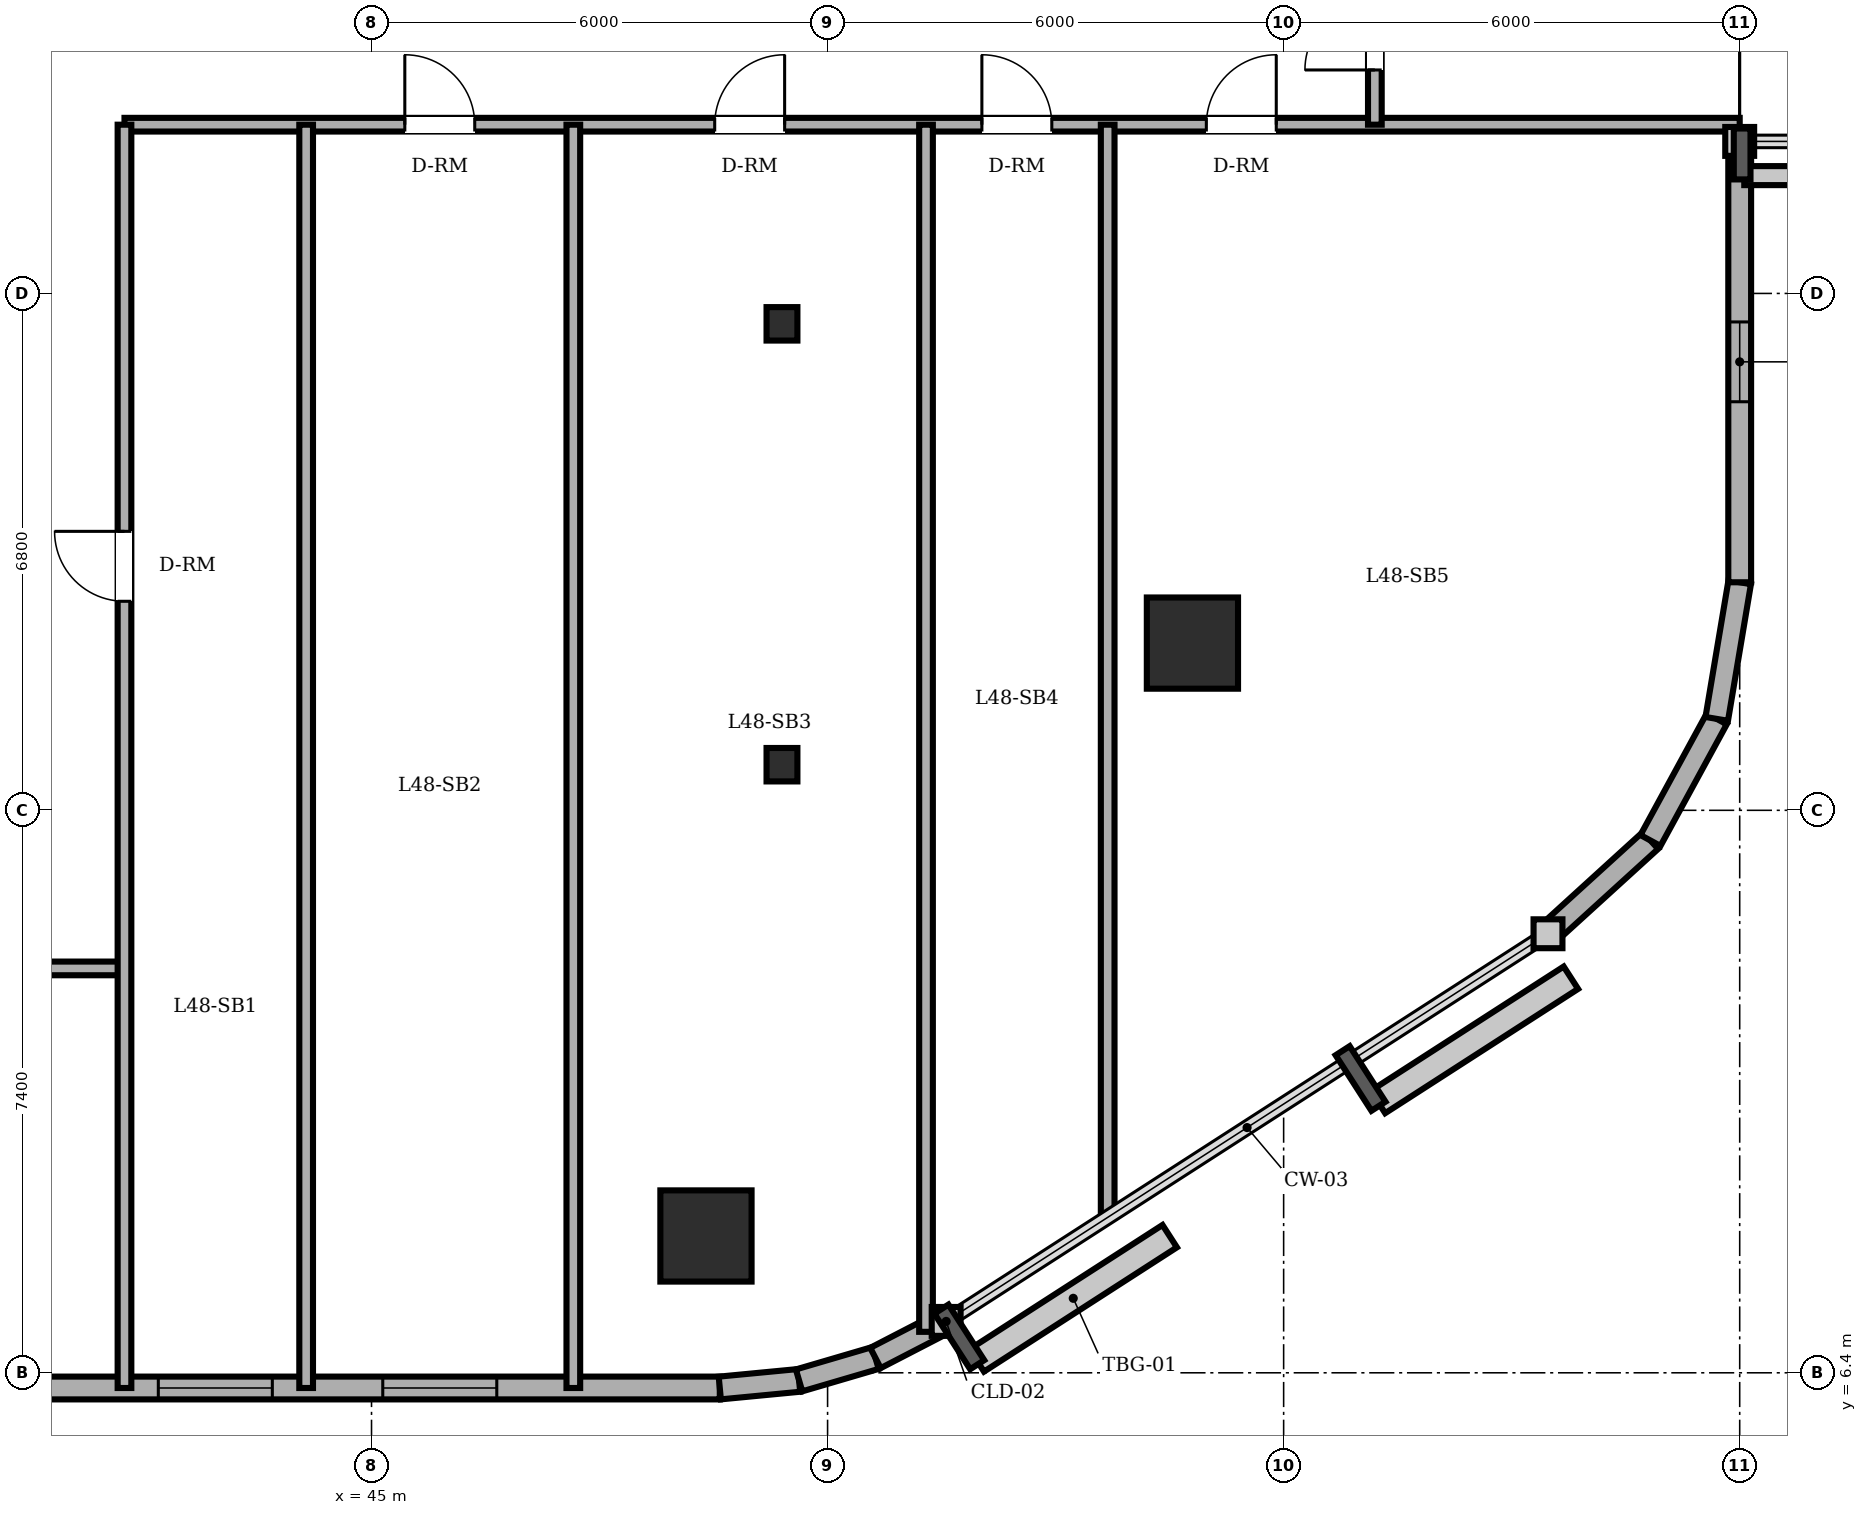
"""IFC4 building model, lengths in metres.
Left out: names, types, materials, properties, quantities, classifications, styles, units other than length and angle.
Written with IfcOpenShell. Run it as: python <this file> out.ifc"""

import sys

from ifc_helpers import new_model, si_unit, direction, frame, frame_2d, origin, origin_2d, place, context, subcontext, project, spatial, rectangle, circle, i_section, extrude, element, fill, save


model = new_model("IFC4")
c1 = context("Model", 3, precision=1e-05, world=origin(), true_north=direction((0.0, 1.0)))
c2 = subcontext(c1, "Body", "Model", "MODEL_VIEW")
j1 = project(units=[si_unit("LENGTHUNIT", "METRE"), si_unit("PLANEANGLEUNIT", "RADIAN")], contexts=[c1])
p1 = place(None, origin())
s1 = spatial("IfcSite", under=j1, at=p1, CompositionType="ELEMENT")
p2 = place(p1, origin())
s2 = spatial("IfcBuilding", under=s1, at=p2, CompositionType="ELEMENT")
p3 = place(p2, frame((0.0, 0.0, 183.4)))
s3 = spatial("IfcBuildingStorey", under=s2, at=p3, CompositionType="ELEMENT", Elevation=183.4)
for number, where, z_axis, x_axis in (
    (1, (49.4, 8.2, 0.0), (0.0, 0.0, 1.0), (1.0, 0.0, 0.0)),
    (2, (55.8, 16.0, 0.0), (0.0, 0.0, 1.0), (1.0, 0.0, 0.0)),
):
    element("IfcColumn", number, at=place(p3, frame(where, z_axis=z_axis, x_axis=x_axis)), inside=s3, PredefinedType="COLUMN", context=c2, shape_type="SweptSolid", body=[
        extrude(circle(Radius=0.6, at=origin_2d()), origin(), (0.0, 0.0, 1.0), 3.6),
    ])
for number, where, z_axis, x_axis in (
    (3, (50.4, 14.4, 0.0), (0.0, 0.0, 1.0), (1.0, 0.0, 0.0)),
    (4, (50.4, 20.2, 0.0), (0.0, 0.0, 1.0), (1.0, 0.0, 0.0)),
):
    element("IfcColumn", number, at=place(p3, frame(where, z_axis=z_axis, x_axis=x_axis)), inside=s3, PredefinedType="COLUMN", context=c2, shape_type="SweptSolid", body=[
        extrude(i_section(OverallWidth=0.406, OverallDepth=0.44, WebThickness=0.024, FlangeThickness=0.039, FilletRadius=0.015, at=origin_2d()), origin(), (0.0, 0.0, 1.0), 3.6),
    ])
p4 = place(p3, frame((19.3, 6.2, 0.0), z_axis=(0.0, 0.0, 1.0), x_axis=(1.0, 0.0, 0.0)))
e5 = element("IfcWall", 5, at=p4, inside=s3, PredefinedType="SOLIDWALL", context=c2, shape_type="SweptSolid", body=[
    extrude(rectangle(XDim=30.282, YDim=0.3, at=frame_2d((15.141, 0.0))), origin(), (0.0, 0.0, 1.0), 3.4),
])
p5 = place(p4, frame((3.725, 0.0, 0.0)))
e6 = element("IfcOpeningElement", 6, at=p5, cuts=e5, PredefinedType="OPENING", context=c2, shape_type="SweptSolid", body=[
    extrude(rectangle(XDim=0.95, YDim=2.2, at=frame_2d((0.475, 1.1))), frame((0.0, 0.16, 0.0), z_axis=(0.0, -1.0, 0.0), x_axis=(1.0, 0.0, 0.0)), (0.0, 0.0, 1.0), 0.32),
])
p6 = place(p4, frame((1.25, 0.0, 0.85)))
e7 = element("IfcOpeningElement", 7, at=p6, cuts=e5, PredefinedType="OPENING", context=c2, shape_type="SweptSolid", body=[
    extrude(rectangle(XDim=1.5, YDim=1.55, at=frame_2d((0.75, 0.775))), frame((0.0, 0.16, 0.0), z_axis=(0.0, -1.0, 0.0), x_axis=(1.0, 0.0, 0.0)), (0.0, 0.0, 1.0), 0.32),
])
p7 = place(p4, frame((6.45, 0.0, 0.85)))
e8 = element("IfcOpeningElement", 8, at=p7, cuts=e5, PredefinedType="OPENING", context=c2, shape_type="SweptSolid", body=[
    extrude(rectangle(XDim=1.5, YDim=1.55, at=frame_2d((0.75, 0.775))), frame((0.0, 0.16, 0.0), z_axis=(0.0, -1.0, 0.0), x_axis=(1.0, 0.0, 0.0)), (0.0, 0.0, 1.0), 0.32),
])
p8 = place(p4, frame((12.8, 0.0, 0.85)))
e9 = element("IfcOpeningElement", 9, at=p8, cuts=e5, PredefinedType="OPENING", context=c2, shape_type="SweptSolid", body=[
    extrude(rectangle(XDim=1.5, YDim=1.55, at=frame_2d((0.75, 0.775))), frame((0.0, 0.16, 0.0), z_axis=(0.0, -1.0, 0.0), x_axis=(1.0, 0.0, 0.0)), (0.0, 0.0, 1.0), 0.32),
])
p9 = place(p4, frame((17.25, 0.0, 0.85)))
e10 = element("IfcOpeningElement", 10, at=p9, cuts=e5, PredefinedType="OPENING", context=c2, shape_type="SweptSolid", body=[
    extrude(rectangle(XDim=1.5, YDim=1.55, at=frame_2d((0.75, 0.775))), frame((0.0, 0.16, 0.0), z_axis=(0.0, -1.0, 0.0), x_axis=(1.0, 0.0, 0.0)), (0.0, 0.0, 1.0), 0.32),
])
p10 = place(p4, frame((22.895, 0.0, 0.85)))
e11 = element("IfcOpeningElement", 11, at=p10, cuts=e5, PredefinedType="OPENING", context=c2, shape_type="SweptSolid", body=[
    extrude(rectangle(XDim=1.5, YDim=1.55, at=frame_2d((0.75, 0.775))), frame((0.0, 0.16, 0.0), z_axis=(0.0, -1.0, 0.0), x_axis=(1.0, 0.0, 0.0)), (0.0, 0.0, 1.0), 0.32),
])
p11 = place(p4, frame((25.848, 0.0, 0.85)))
e12 = element("IfcOpeningElement", 12, at=p11, cuts=e5, PredefinedType="OPENING", context=c2, shape_type="SweptSolid", body=[
    extrude(rectangle(XDim=1.5, YDim=1.55, at=frame_2d((0.75, 0.775))), frame((0.0, 0.16, 0.0), z_axis=(0.0, -1.0, 0.0), x_axis=(1.0, 0.0, 0.0)), (0.0, 0.0, 1.0), 0.32),
])
p12 = place(p3, frame((49.582, 6.2, 0.0), z_axis=(0.0, 0.0, 1.0), x_axis=(0.995426089968, 0.095534807324, 0.0)))
e13 = element("IfcWall", 13, at=p12, inside=s3, PredefinedType="SOLIDWALL", context=c2, shape_type="SweptSolid", body=[
    extrude(rectangle(XDim=1.048, YDim=0.3, at=frame_2d((0.524, 0.0))), origin(), (0.0, 0.0, 1.0), 3.4),
])
p13 = place(p3, frame((50.625, 6.3, 0.0), z_axis=(0.0, 0.0, 1.0), x_axis=(0.959528674476, 0.281610942363, 0.0)))
e14 = element("IfcWall", 14, at=p13, inside=s3, PredefinedType="SOLIDWALL", context=c2, shape_type="SweptSolid", body=[
    extrude(rectangle(XDim=1.047, YDim=0.3, at=frame_2d((0.524, 0.0))), origin(), (0.0, 0.0, 1.0), 3.4),
])
p14 = place(p3, frame((51.63, 6.595, 0.0), z_axis=(0.0, 0.0, 1.0), x_axis=(0.888283247196, 0.459296062198, 0.0)))
e15 = element("IfcWall", 15, at=p14, inside=s3, PredefinedType="SOLIDWALL", context=c2, shape_type="SweptSolid", body=[
    extrude(rectangle(XDim=1.047, YDim=0.3, at=frame_2d((0.523, 0.0))), origin(), (0.0, 0.0, 1.0), 3.4),
])
p15 = place(p3, frame((60.478, 12.176, 0.0), z_axis=(0.0, 0.0, 1.0), x_axis=(0.73947929393, 0.673179302897, 0.0)))
e16 = element("IfcWall", 16, at=p15, inside=s3, PredefinedType="SOLIDWALL", context=c2, shape_type="SweptSolid", body=[
    extrude(rectangle(XDim=1.823, YDim=0.3, at=frame_2d((0.911, 0.0))), origin(), (0.0, 0.0, 1.0), 3.4),
])
p16 = place(p3, frame((61.826, 13.403, 0.0), z_axis=(0.0, 0.0, 1.0), x_axis=(0.478608030646, 0.878028674362, 0.0)))
e17 = element("IfcWall", 17, at=p16, inside=s3, PredefinedType="SOLIDWALL", context=c2, shape_type="SweptSolid", body=[
    extrude(rectangle(XDim=1.822, YDim=0.3, at=frame_2d((0.911, 0.0))), origin(), (0.0, 0.0, 1.0), 3.4),
])
p17 = place(p3, frame((62.698, 15.003, 0.0), z_axis=(0.0, 0.0, 1.0), x_axis=(0.165724081207, 0.986172159873, 0.0)))
e18 = element("IfcWall", 18, at=p17, inside=s3, PredefinedType="SOLIDWALL", context=c2, shape_type="SweptSolid", body=[
    extrude(rectangle(XDim=1.822, YDim=0.3, at=frame_2d((0.911, 0.0))), origin(), (0.0, 0.0, 1.0), 3.4),
])
p18 = place(p3, frame((63.0, 16.8, 0.0), z_axis=(0.0, 0.0, 1.0), x_axis=(0.0, 1.0, 0.0)))
e19 = element("IfcWall", 19, at=p18, inside=s3, PredefinedType="SOLIDWALL", context=c2, shape_type="SweptSolid", body=[
    extrude(rectangle(XDim=5.8, YDim=0.3, at=frame_2d((2.9, 0.0))), origin(), (0.0, 0.0, 1.0), 3.4),
])
p19 = place(p18, frame((2.375, 0.0, 0.85)))
e20 = element("IfcOpeningElement", 20, at=p19, cuts=e19, PredefinedType="OPENING", context=c2, shape_type="SweptSolid", body=[
    extrude(rectangle(XDim=1.05, YDim=1.55, at=frame_2d((0.525, 0.775))), frame((0.0, 0.16, 0.0), z_axis=(0.0, -1.0, 0.0), x_axis=(1.0, 0.0, 0.0)), (0.0, 0.0, 1.0), 0.32),
])
p20 = place(p3, frame((13.8, 11.72, 0.0), z_axis=(0.0, 0.0, 1.0), x_axis=(1.0, 0.0, 0.0)))
e21 = element("IfcWall", 21, at=p20, inside=s3, PredefinedType="PARTITIONING", context=c2, shape_type="SweptSolid", body=[
    extrude(rectangle(XDim=27.95, YDim=0.18, at=frame_2d((13.975, 0.0))), origin(), (0.0, 0.0, 1.0), 3.4),
])
p21 = place(p20, frame((12.24, 0.0, 0.0)))
e22 = element("IfcOpeningElement", 22, at=p21, cuts=e21, PredefinedType="OPENING", context=c2, shape_type="SweptSolid", body=[
    extrude(rectangle(XDim=0.92, YDim=2.1, at=frame_2d((0.46, 1.05))), frame((0.0, 0.1, 0.0), z_axis=(0.0, -1.0, 0.0), x_axis=(1.0, 0.0, 0.0)), (0.0, 0.0, 1.0), 0.2),
])
p22 = place(p20, frame((5.54, 0.0, 0.0)))
e23 = element("IfcOpeningElement", 23, at=p22, cuts=e21, PredefinedType="OPENING", context=c2, shape_type="SweptSolid", body=[
    extrude(rectangle(XDim=0.92, YDim=2.1, at=frame_2d((0.46, 1.05))), frame((0.0, 0.1, 0.0), z_axis=(0.0, -1.0, 0.0), x_axis=(1.0, 0.0, 0.0)), (0.0, 0.0, 1.0), 0.2),
])
p23 = place(p20, frame((20.555, 0.0, 0.0)))
e24 = element("IfcOpeningElement", 24, at=p23, cuts=e21, PredefinedType="OPENING", context=c2, shape_type="SweptSolid", body=[
    extrude(rectangle(XDim=0.92, YDim=2.1, at=frame_2d((0.46, 1.05))), frame((0.0, 0.1, 0.0), z_axis=(0.0, -1.0, 0.0), x_axis=(1.0, 0.0, 0.0)), (0.0, 0.0, 1.0), 0.2),
])
p24 = place(p3, frame((41.75, 22.82, 0.0), z_axis=(0.0, 0.0, 1.0), x_axis=(1.0, 0.0, 0.0)))
e25 = element("IfcWall", 25, at=p24, inside=s3, PredefinedType="PARTITIONING", context=c2, shape_type="SweptSolid", body=[
    extrude(rectangle(XDim=21.25, YDim=0.18, at=frame_2d((10.625, 0.0))), origin(), (0.0, 0.0, 1.0), 3.4),
])
p25 = place(p24, frame((3.688, 0.0, 0.0)))
e26 = element("IfcOpeningElement", 26, at=p25, cuts=e25, PredefinedType="OPENING", context=c2, shape_type="SweptSolid", body=[
    extrude(rectangle(XDim=0.92, YDim=2.1, at=frame_2d((0.46, 1.05))), frame((0.0, 0.1, 0.0), z_axis=(0.0, -1.0, 0.0), x_axis=(1.0, 0.0, 0.0)), (0.0, 0.0, 1.0), 0.2),
])
p26 = place(p24, frame((7.765, 0.0, 0.0)))
e27 = element("IfcOpeningElement", 27, at=p26, cuts=e25, PredefinedType="OPENING", context=c2, shape_type="SweptSolid", body=[
    extrude(rectangle(XDim=0.92, YDim=2.1, at=frame_2d((0.46, 1.05))), frame((0.0, 0.1, 0.0), z_axis=(0.0, -1.0, 0.0), x_axis=(1.0, 0.0, 0.0)), (0.0, 0.0, 1.0), 0.2),
])
p27 = place(p24, frame((11.28, 0.0, 0.0)))
e28 = element("IfcOpeningElement", 28, at=p27, cuts=e25, PredefinedType="OPENING", context=c2, shape_type="SweptSolid", body=[
    extrude(rectangle(XDim=0.92, YDim=2.1, at=frame_2d((0.46, 1.05))), frame((0.0, 0.1, 0.0), z_axis=(0.0, -1.0, 0.0), x_axis=(1.0, 0.0, 0.0)), (0.0, 0.0, 1.0), 0.2),
])
p28 = place(p24, frame((14.233, 0.0, 0.0)))
e29 = element("IfcOpeningElement", 29, at=p28, cuts=e25, PredefinedType="OPENING", context=c2, shape_type="SweptSolid", body=[
    extrude(rectangle(XDim=0.92, YDim=2.1, at=frame_2d((0.46, 1.05))), frame((0.0, 0.1, 0.0), z_axis=(0.0, -1.0, 0.0), x_axis=(1.0, 0.0, 0.0)), (0.0, 0.0, 1.0), 0.2),
])
p29 = place(p3, frame((41.75, 6.2, 0.0), z_axis=(0.0, 0.0, 1.0), x_axis=(0.0, 1.0, 0.0)))
e30 = element("IfcWall", 30, at=p29, inside=s3, PredefinedType="PARTITIONING", context=c2, shape_type="SweptSolid", body=[
    extrude(rectangle(XDim=16.62, YDim=0.18, at=frame_2d((8.31, 0.0))), origin(), (0.0, 0.0, 1.0), 3.4),
])
p30 = place(p29, frame((10.35, 0.0, 0.0)))
e31 = element("IfcOpeningElement", 31, at=p30, cuts=e30, PredefinedType="OPENING", context=c2, shape_type="SweptSolid", body=[
    extrude(rectangle(XDim=0.92, YDim=2.1, at=frame_2d((0.46, 1.05))), frame((0.0, 0.1, 0.0), z_axis=(0.0, -1.0, 0.0), x_axis=(1.0, 0.0, 0.0)), (0.0, 0.0, 1.0), 0.2),
])
for number, where, z_axis, x_axis in (
    (32, (44.14, 6.2, 0.0), (0.0, 0.0, 1.0), (0.0, 1.0, 0.0)),
    (33, (47.655, 6.2, 0.0), (0.0, 0.0, 1.0), (0.0, 1.0, 0.0)),
):
    element("IfcWall", number, at=place(p3, frame(where, z_axis=z_axis, x_axis=x_axis)), inside=s3, PredefinedType="PARTITIONING", context=c2, shape_type="SweptSolid", body=[
        extrude(rectangle(XDim=16.62, YDim=0.18, at=frame_2d((8.31, 0.0))), origin(), (0.0, 0.0, 1.0), 3.4),
    ])
p31 = place(p3, frame((52.295, 6.939, 0.0), z_axis=(0.0, 0.0, 1.0), x_axis=(0.0, 1.0, 0.0)))
e34 = element("IfcWall", 34, at=p31, inside=s3, PredefinedType="PARTITIONING", context=c2, shape_type="SweptSolid", body=[
    extrude(rectangle(XDim=15.881, YDim=0.18, at=frame_2d((7.94, 0.0))), origin(), (0.0, 0.0, 1.0), 3.4),
])
p32 = place(p3, frame((54.685, 8.445, 0.0), z_axis=(0.0, 0.0, 1.0), x_axis=(0.0, 1.0, 0.0)))
e35 = element("IfcWall", 35, at=p32, inside=s3, PredefinedType="PARTITIONING", context=c2, shape_type="SweptSolid", body=[
    extrude(rectangle(XDim=14.375, YDim=0.18, at=frame_2d((7.188, 0.0))), origin(), (0.0, 0.0, 1.0), 3.4),
])
p33 = place(p3, frame((58.2, 22.82, 0.0), z_axis=(0.0, 0.0, 1.0), x_axis=(0.0, 1.0, 0.0)))
e36 = element("IfcWall", 36, at=p33, inside=s3, PredefinedType="PARTITIONING", context=c2, shape_type="SweptSolid", body=[
    extrude(rectangle(XDim=2.36, YDim=0.18, at=frame_2d((1.18, 0.0))), origin(), (0.0, 0.0, 1.0), 3.4),
])
p34 = place(p33, frame((0.72, 0.0, 0.0)))
e37 = element("IfcOpeningElement", 37, at=p34, cuts=e36, PredefinedType="OPENING", context=c2, shape_type="SweptSolid", body=[
    extrude(rectangle(XDim=0.92, YDim=2.1, at=frame_2d((0.46, 1.05))), frame((0.0, 0.1, 0.0), z_axis=(0.0, -1.0, 0.0), x_axis=(1.0, 0.0, 0.0)), (0.0, 0.0, 1.0), 0.2),
])
p35 = place(p10, origin())
e38 = element("IfcWindow", 38, at=p35, inside=s3, PartitioningType="DOUBLE_PANEL_VERTICAL", PredefinedType="WINDOW", context=c2, shape_type="SweptSolid", body=[
    extrude(rectangle(XDim=1.5, YDim=1.55, at=frame_2d((0.75, 0.775))), frame((0.0, 0.03, 0.0), z_axis=(0.0, -1.0, 0.0), x_axis=(1.0, 0.0, 0.0)), (0.0, 0.0, 1.0), 0.06),
])
fill(e11, e38)
p36 = place(p11, origin())
e39 = element("IfcWindow", 39, at=p36, inside=s3, PartitioningType="DOUBLE_PANEL_VERTICAL", PredefinedType="WINDOW", context=c2, shape_type="SweptSolid", body=[
    extrude(rectangle(XDim=1.5, YDim=1.55, at=frame_2d((0.75, 0.775))), frame((0.0, 0.03, 0.0), z_axis=(0.0, -1.0, 0.0), x_axis=(1.0, 0.0, 0.0)), (0.0, 0.0, 1.0), 0.06),
])
fill(e12, e39)
p37 = place(p19, origin())
e40 = element("IfcWindow", 40, at=p37, inside=s3, PartitioningType="SINGLE_PANEL", PredefinedType="WINDOW", context=c2, shape_type="SweptSolid", body=[
    extrude(rectangle(XDim=1.05, YDim=1.55, at=frame_2d((0.525, 0.775))), frame((0.0, 0.03, 0.0), z_axis=(0.0, -1.0, 0.0), x_axis=(1.0, 0.0, 0.0)), (0.0, 0.0, 1.0), 0.06),
])
fill(e20, e40)
p38 = place(p30, origin())
e41 = element("IfcDoor", 41, at=p38, inside=s3, OperationType="SINGLE_SWING_RIGHT", PredefinedType="DOOR", context=c2, shape_type="SweptSolid", body=[
    extrude(rectangle(XDim=0.92, YDim=2.1, at=frame_2d((0.46, 1.05))), frame((0.0, 0.025, 0.0), z_axis=(0.0, -1.0, 0.0), x_axis=(1.0, 0.0, 0.0)), (0.0, 0.0, 1.0), 0.05),
])
fill(e31, e41)
p39 = place(p25, origin())
e42 = element("IfcDoor", 42, at=p39, inside=s3, OperationType="SINGLE_SWING_LEFT", PredefinedType="DOOR", context=c2, shape_type="SweptSolid", body=[
    extrude(rectangle(XDim=0.92, YDim=2.1, at=frame_2d((0.46, 1.05))), frame((0.0, 0.025, 0.0), z_axis=(0.0, -1.0, 0.0), x_axis=(1.0, 0.0, 0.0)), (0.0, 0.0, 1.0), 0.05),
])
fill(e26, e42)
p40 = place(p26, origin())
e43 = element("IfcDoor", 43, at=p40, inside=s3, OperationType="SINGLE_SWING_RIGHT", PredefinedType="DOOR", context=c2, shape_type="SweptSolid", body=[
    extrude(rectangle(XDim=0.92, YDim=2.1, at=frame_2d((0.46, 1.05))), frame((0.0, 0.025, 0.0), z_axis=(0.0, -1.0, 0.0), x_axis=(1.0, 0.0, 0.0)), (0.0, 0.0, 1.0), 0.05),
])
fill(e27, e43)
p41 = place(p27, origin())
e44 = element("IfcDoor", 44, at=p41, inside=s3, OperationType="SINGLE_SWING_LEFT", PredefinedType="DOOR", context=c2, shape_type="SweptSolid", body=[
    extrude(rectangle(XDim=0.92, YDim=2.1, at=frame_2d((0.46, 1.05))), frame((0.0, 0.025, 0.0), z_axis=(0.0, -1.0, 0.0), x_axis=(1.0, 0.0, 0.0)), (0.0, 0.0, 1.0), 0.05),
])
fill(e28, e44)
p42 = place(p28, origin())
e45 = element("IfcDoor", 45, at=p42, inside=s3, OperationType="SINGLE_SWING_RIGHT", PredefinedType="DOOR", context=c2, shape_type="SweptSolid", body=[
    extrude(rectangle(XDim=0.92, YDim=2.1, at=frame_2d((0.46, 1.05))), frame((0.0, 0.025, 0.0), z_axis=(0.0, -1.0, 0.0), x_axis=(1.0, 0.0, 0.0)), (0.0, 0.0, 1.0), 0.05),
])
fill(e29, e45)
p43 = place(p34, origin())
e46 = element("IfcDoor", 46, at=p43, inside=s3, OperationType="SINGLE_SWING_LEFT", PredefinedType="DOOR", context=c2, shape_type="SweptSolid", body=[
    extrude(rectangle(XDim=0.92, YDim=2.1, at=frame_2d((0.46, 1.05))), frame((0.0, 0.025, 0.0), z_axis=(0.0, -1.0, 0.0), x_axis=(1.0, 0.0, 0.0)), (0.0, 0.0, 1.0), 0.05),
])
fill(e37, e46)
save(model, sys.argv[1])
